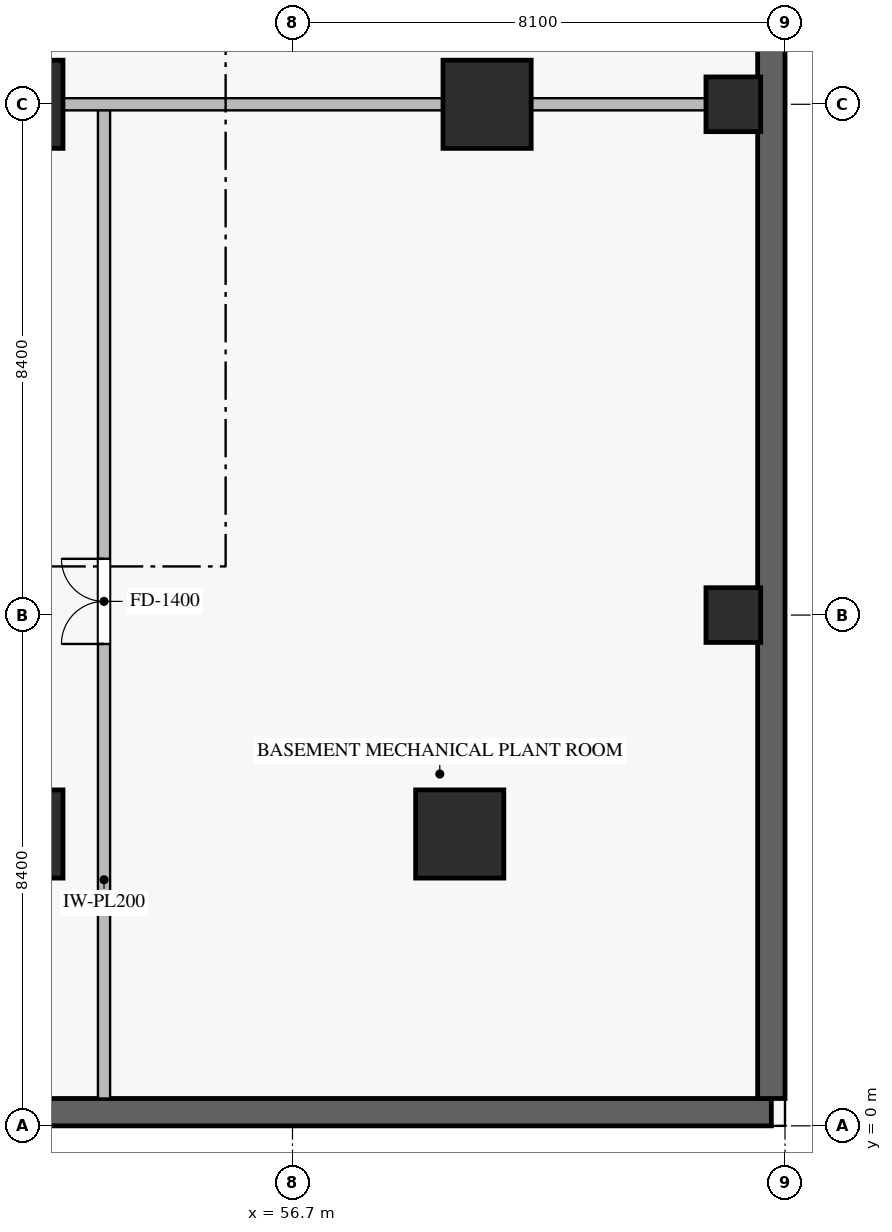
"""IFC4 building model, lengths in metres.
Left out: names, types, materials, properties, quantities, classifications, styles, units other than length and angle.
Written with IfcOpenShell. Run it as: python <this file> out.ifc"""

import sys

from ifc_helpers import new_model, si_unit, direction, frame, frame_2d, origin, origin_2d, place, context, subcontext, project, spatial, rectangle, extrude, source, transform, mapped, element, fill, save


model = new_model("IFC4")
c1 = context("Model", 3, precision=1e-05, world=origin(), true_north=direction((0.0, 1.0)))
c2 = subcontext(c1, "Body", "Model", "MODEL_VIEW")
j1 = project(units=[si_unit("LENGTHUNIT", "METRE"), si_unit("PLANEANGLEUNIT", "RADIAN")], contexts=[c1])
p1 = place(None, origin())
s1 = spatial("IfcSite", under=j1, at=p1, CompositionType="ELEMENT")
p2 = place(p1, origin())
s2 = spatial("IfcBuilding", under=s1, at=p2, CompositionType="ELEMENT")
p3 = place(p2, frame((0.0, 0.0, -3.6)))
s3 = spatial("IfcBuildingStorey", under=s2, at=p3, CompositionType="ELEMENT", Elevation=-3.6)
p4 = place(p3, frame((0.225, 0.225, -0.36), z_axis=(0.0, 0.0, 1.0), x_axis=(1.0, 0.0, 0.0)))
e1 = element("IfcWall", 1, at=p4, inside=s3, PredefinedType="USERDEFINED", context=c2, shape_type="SweptSolid", body=[
    extrude(rectangle(XDim=64.35, YDim=0.45, at=frame_2d((32.175, 0.0))), origin(), (0.0, 0.0, 1.0), 3.578),
])
p5 = place(p3, frame((64.575, 0.45, -0.36), z_axis=(0.0, 0.0, 1.0), x_axis=(0.0, 1.0, 0.0)))
e2 = element("IfcWall", 2, at=p5, inside=s3, PredefinedType="USERDEFINED", context=c2, shape_type="SweptSolid", body=[
    extrude(rectangle(XDim=49.5, YDim=0.45, at=frame_2d((24.75, 0.0))), origin(), (0.0, 0.0, 1.0), 3.578),
])
m1 = source(origin(), c2, "Body", "SweptSolid", [
    extrude(rectangle(XDim=0.9, YDim=0.9, at=origin_2d()), origin(), (0.0, 0.0, 1.0), 3.58),
])
for number, where, z_axis, x_axis in (
    (3, (63.95, 8.4, -0.36), (0.0, 0.0, 1.0), (1.0, 0.0, 0.0)),
    (4, (63.95, 16.8, -0.36), (0.0, 0.0, 1.0), (1.0, 0.0, 0.0)),
):
    element("IfcColumn", number, at=place(p3, frame(where, z_axis=z_axis, x_axis=x_axis)), inside=s3, PredefinedType="COLUMN", context=c2, shape_type="MappedRepresentation", body=[
        mapped(m1, transform((0.0, 0.0, 0.0), scale=1.0)),
    ])
m2 = source(origin(), c2, "Body", "SweptSolid", [
    extrude(rectangle(XDim=1.45, YDim=1.45, at=origin_2d()), origin(), (0.0, 0.0, 1.0), 3.58),
])
for number, where, z_axis, x_axis in (
    (5, (52.2, 4.8, -0.36), (0.0, 0.0, 1.0), (1.0, 0.0, 0.0)),
    (6, (52.2, 16.8, -0.36), (0.0, 0.0, 1.0), (1.0, 0.0, 0.0)),
    (7, (59.9, 16.8, -0.36), (0.0, 0.0, 1.0), (1.0, 0.0, 0.0)),
    (8, (59.45, 4.8, -0.36), (0.0, 0.0, 1.0), (1.0, 0.0, 0.0)),
):
    element("IfcColumn", number, at=place(p3, frame(where, z_axis=z_axis, x_axis=x_axis)), inside=s3, PredefinedType="COLUMN", context=c2, shape_type="MappedRepresentation", body=[
        mapped(m2, transform((0.0, 0.0, 0.0), scale=1.0)),
    ])
p6 = place(p3, frame((53.6, 0.45, 0.0), z_axis=(0.0, 0.0, 1.0), x_axis=(0.0, 1.0, 0.0)))
e9 = element("IfcWall", 9, at=p6, inside=s3, PredefinedType="STANDARD", context=c2, shape_type="SweptSolid", body=[
    extrude(rectangle(XDim=16.35, YDim=0.2, at=frame_2d((8.175, 0.0))), origin(), (0.0, 0.0, 1.0), 3.22),
])
p7 = place(p6, frame((7.475, 0.0, 0.0)))
e10 = element("IfcOpeningElement", 10, at=p7, cuts=e9, PredefinedType="OPENING", context=c2, shape_type="SweptSolid", body=[
    extrude(rectangle(XDim=1.4, YDim=2.2, at=frame_2d((0.7, 1.1))), frame((0.0, 0.11, 0.0), z_axis=(0.0, -1.0, 0.0), x_axis=(1.0, 0.0, 0.0)), (0.0, 0.0, 1.0), 0.22),
])
p8 = place(p3, frame((41.625, 16.8, 0.0), z_axis=(0.0, 0.0, 1.0), x_axis=(1.0, 0.0, 0.0)))
e11 = element("IfcWall", 11, at=p8, inside=s3, PredefinedType="STANDARD", context=c2, shape_type="SweptSolid", body=[
    extrude(rectangle(XDim=22.725, YDim=0.2, at=frame_2d((11.363, 0.0))), origin(), (0.0, 0.0, 1.0), 2.652),
])
p9 = place(p8, frame((4.697, 0.0, 0.0)))
e12 = element("IfcOpeningElement", 12, at=p9, cuts=e11, PredefinedType="OPENING", context=c2, shape_type="SweptSolid", body=[
    extrude(rectangle(XDim=3.8, YDim=2.5, at=frame_2d((1.9, 1.25))), frame((0.0, 0.11, 0.0), z_axis=(0.0, -1.0, 0.0), x_axis=(1.0, 0.0, 0.0)), (0.0, 0.0, 1.0), 0.22),
])
m3 = source(origin(), c2, "Body", "SweptSolid", [
    extrude(rectangle(XDim=1.4, YDim=2.2, at=frame_2d((0.7, 1.1))), frame((0.0, 0.025, 0.0), z_axis=(0.0, -1.0, 0.0), x_axis=(1.0, 0.0, 0.0)), (0.0, 0.0, 1.0), 0.05),
])
p10 = place(p7, origin())
e13 = element("IfcDoor", 13, at=p10, inside=s3, OperationType="DOUBLE_DOOR_SINGLE_SWING", PredefinedType="DOOR", context=c2, shape_type="MappedRepresentation", body=[
    mapped(m3, transform((0.0, 0.0, 0.0), scale=1.0)),
])
fill(e10, e13)
save(model, sys.argv[1])
